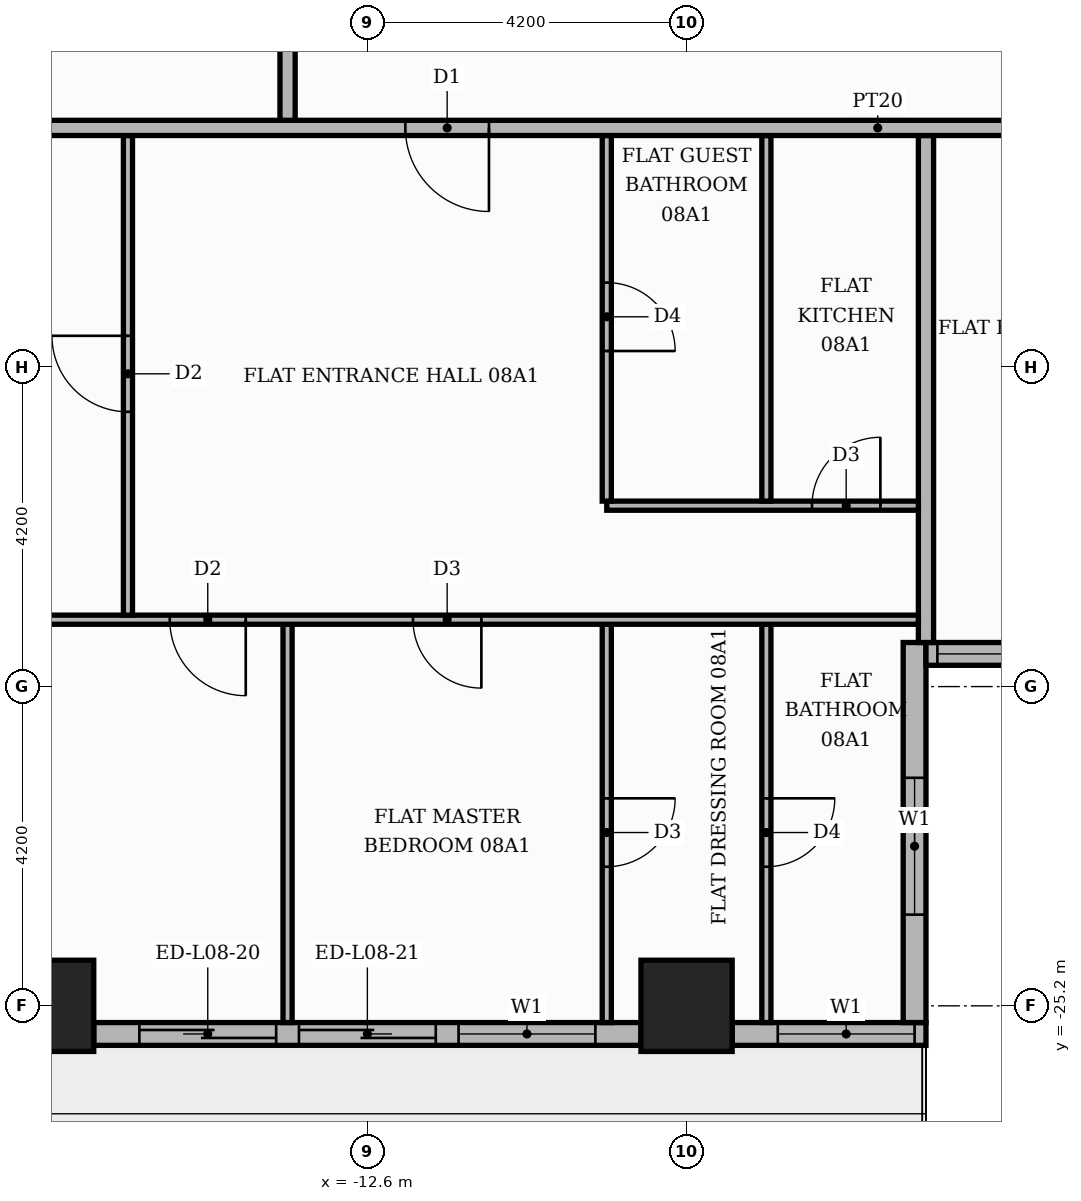
"""IFC4 building model, lengths in metres.
Left out: names, types, materials, properties, quantities, classifications, styles, units other than length and angle.
Written with IfcOpenShell. Run it as: python <this file> out.ifc"""

import sys

from ifc_helpers import new_model, si_unit, direction, frame, frame_2d, origin, origin_2d, place, context, subcontext, project, spatial, rectangle, extrude, element, fill, save


model = new_model("IFC4")
c1 = context("Model", 3, precision=1e-05, world=origin(), true_north=direction((0.0, 1.0)))
c2 = subcontext(c1, "Body", "Model", "MODEL_VIEW")
j1 = project(units=[si_unit("LENGTHUNIT", "METRE"), si_unit("PLANEANGLEUNIT", "RADIAN")], contexts=[c1])
p1 = place(None, origin())
s1 = spatial("IfcSite", under=j1, at=p1, CompositionType="ELEMENT")
p2 = place(p1, origin())
s2 = spatial("IfcBuilding", under=s1, at=p2, CompositionType="ELEMENT")
p3 = place(p2, frame((0.0, 0.0, 38.7)))
s3 = spatial("IfcBuildingStorey", under=s2, at=p3, CompositionType="ELEMENT", Elevation=38.7)
for number, where, z_axis, x_axis in (
    (1, (-8.4, -25.2, 0.0), (0.0, 0.0, 1.0), (1.0, 0.0, 0.0)),
    (2, (-16.8, -25.2, 0.0), (0.0, 0.0, 1.0), (1.0, 0.0, 0.0)),
):
    element("IfcColumn", number, at=place(p3, frame(where, z_axis=z_axis, x_axis=x_axis)), inside=s3, PredefinedType="COLUMN", context=c2, shape_type="SweptSolid", body=[
        extrude(rectangle(XDim=1.2, YDim=1.2, at=origin_2d()), origin(), (0.0, 0.0, 1.0), 3.9),
    ])
p4 = place(p3, frame((-16.2, -25.57, 0.0), z_axis=(0.0, 0.0, 1.0), x_axis=(1.0, 0.0, 0.0)))
e3 = element("IfcWall", 3, at=p4, inside=s3, PredefinedType="STANDARD", context=c2, shape_type="SweptSolid", body=[
    extrude(rectangle(XDim=7.2, YDim=0.3, at=frame_2d((3.6, 0.0))), origin(), (0.0, 0.0, 1.0), 3.48),
])
p5 = place(p4, frame((0.6, 0.0, 0.0)))
e4 = element("IfcOpeningElement", 4, at=p5, cuts=e3, PredefinedType="OPENING", context=c2, shape_type="SweptSolid", body=[
    extrude(rectangle(XDim=1.8, YDim=2.4, at=frame_2d((0.9, 1.2))), frame((0.0, 0.16, 0.0), z_axis=(0.0, -1.0, 0.0), x_axis=(1.0, 0.0, 0.0)), (0.0, 0.0, 1.0), 0.32),
])
p6 = place(p4, frame((2.7, 0.0, 0.0)))
e5 = element("IfcOpeningElement", 5, at=p6, cuts=e3, PredefinedType="OPENING", context=c2, shape_type="SweptSolid", body=[
    extrude(rectangle(XDim=1.8, YDim=2.4, at=frame_2d((0.9, 1.2))), frame((0.0, 0.16, 0.0), z_axis=(0.0, -1.0, 0.0), x_axis=(1.0, 0.0, 0.0)), (0.0, 0.0, 1.0), 0.32),
])
p7 = place(p4, frame((4.8, 0.0, 0.9)))
e6 = element("IfcOpeningElement", 6, at=p7, cuts=e3, PredefinedType="OPENING", context=c2, shape_type="SweptSolid", body=[
    extrude(rectangle(XDim=1.8, YDim=2.1, at=frame_2d((0.9, 1.05))), frame((0.0, 0.16, 0.0), z_axis=(0.0, -1.0, 0.0), x_axis=(1.0, 0.0, 0.0)), (0.0, 0.0, 1.0), 0.32),
])
p8 = place(p3, frame((-7.8, -25.57, 0.0), z_axis=(0.0, 0.0, 1.0), x_axis=(1.0, 0.0, 0.0)))
e7 = element("IfcWall", 7, at=p8, inside=s3, PredefinedType="STANDARD", context=c2, shape_type="SweptSolid", body=[
    extrude(rectangle(XDim=2.55, YDim=0.3, at=frame_2d((1.275, 0.0))), origin(), (0.0, 0.0, 1.0), 3.48),
])
p9 = place(p8, frame((0.6, 0.0, 0.9)))
e8 = element("IfcOpeningElement", 8, at=p9, cuts=e7, PredefinedType="OPENING", context=c2, shape_type="SweptSolid", body=[
    extrude(rectangle(XDim=1.8, YDim=2.1, at=frame_2d((0.9, 1.05))), frame((0.0, 0.16, 0.0), z_axis=(0.0, -1.0, 0.0), x_axis=(1.0, 0.0, 0.0)), (0.0, 0.0, 1.0), 0.32),
])
p10 = place(p3, frame((-5.4, -25.42, 0.0), z_axis=(0.0, 0.0, 1.0), x_axis=(0.0, 1.0, 0.0)))
e9 = element("IfcWall", 9, at=p10, inside=s3, PredefinedType="STANDARD", context=c2, shape_type="SweptSolid", body=[
    extrude(rectangle(XDim=5.0, YDim=0.3, at=frame_2d((2.5, 0.0))), origin(), (0.0, 0.0, 1.0), 3.48),
])
p11 = place(p10, frame((1.42, 0.0, 0.9)))
e10 = element("IfcOpeningElement", 10, at=p11, cuts=e9, PredefinedType="OPENING", context=c2, shape_type="SweptSolid", body=[
    extrude(rectangle(XDim=1.8, YDim=2.1, at=frame_2d((0.9, 1.05))), frame((0.0, 0.16, 0.0), z_axis=(0.0, -1.0, 0.0), x_axis=(1.0, 0.0, 0.0)), (0.0, 0.0, 1.0), 0.32),
])
p12 = place(p3, frame((-5.25, -20.57, 0.0), z_axis=(0.0, 0.0, 1.0), x_axis=(1.0, 0.0, 0.0)))
e11 = element("IfcWall", 11, at=p12, inside=s3, PredefinedType="STANDARD", context=c2, shape_type="SweptSolid", body=[
    extrude(rectangle(XDim=10.8, YDim=0.3, at=frame_2d((5.4, 0.0))), origin(), (0.0, 0.0, 1.0), 3.48),
])
p13 = place(p12, frame((0.15, 0.0, 0.9)))
e12 = element("IfcOpeningElement", 12, at=p13, cuts=e11, PredefinedType="OPENING", context=c2, shape_type="SweptSolid", body=[
    extrude(rectangle(XDim=6.0, YDim=2.1, at=frame_2d((3.0, 1.05))), frame((0.0, 0.16, 0.0), z_axis=(0.0, -1.0, 0.0), x_axis=(1.0, 0.0, 0.0)), (0.0, 0.0, 1.0), 0.32),
])
p14 = place(p12, frame((6.45, 0.0, 0.9)))
e13 = element("IfcOpeningElement", 13, at=p14, cuts=e11, PredefinedType="OPENING", context=c2, shape_type="SweptSolid", body=[
    extrude(rectangle(XDim=3.9, YDim=2.1, at=frame_2d((1.95, 1.05))), frame((0.0, 0.16, 0.0), z_axis=(0.0, -1.0, 0.0), x_axis=(1.0, 0.0, 0.0)), (0.0, 0.0, 1.0), 0.32),
])
p15 = place(p3, frame((-13.65, -25.42, 0.0), z_axis=(0.0, 0.0, 1.0), x_axis=(0.0, 1.0, 0.0)))
e14 = element("IfcWall", 14, at=p15, inside=s3, PredefinedType="PARTITIONING", context=c2, shape_type="SweptSolid", body=[
    extrude(rectangle(XDim=5.24, YDim=0.12, at=frame_2d((2.62, 0.0))), origin(), (0.0, 0.0, 1.0), 3.48),
])
p16 = place(p3, frame((-9.45, -25.42, 0.0), z_axis=(0.0, 0.0, 1.0), x_axis=(0.0, 1.0, 0.0)))
e15 = element("IfcWall", 15, at=p16, inside=s3, PredefinedType="PARTITIONING", context=c2, shape_type="SweptSolid", body=[
    extrude(rectangle(XDim=5.24, YDim=0.12, at=frame_2d((2.62, 0.0))), origin(), (0.0, 0.0, 1.0), 3.48),
])
p17 = place(p16, frame((2.05, 0.0, 0.0)))
e16 = element("IfcOpeningElement", 16, at=p17, cuts=e15, PredefinedType="OPENING", context=c2, shape_type="SweptSolid", body=[
    extrude(rectangle(XDim=0.9, YDim=2.1, at=frame_2d((0.45, 1.05))), frame((0.0, 0.07, 0.0), z_axis=(0.0, -1.0, 0.0), x_axis=(1.0, 0.0, 0.0)), (0.0, 0.0, 1.0), 0.14),
])
p18 = place(p3, frame((-7.35, -25.42, 0.0), z_axis=(0.0, 0.0, 1.0), x_axis=(0.0, 1.0, 0.0)))
e17 = element("IfcWall", 17, at=p18, inside=s3, PredefinedType="PARTITIONING", context=c2, shape_type="SweptSolid", body=[
    extrude(rectangle(XDim=5.24, YDim=0.12, at=frame_2d((2.62, 0.0))), origin(), (0.0, 0.0, 1.0), 3.48),
])
p19 = place(p18, frame((2.05, 0.0, 0.0)))
e18 = element("IfcOpeningElement", 18, at=p19, cuts=e17, PredefinedType="OPENING", context=c2, shape_type="SweptSolid", body=[
    extrude(rectangle(XDim=0.9, YDim=2.1, at=frame_2d((0.45, 1.05))), frame((0.0, 0.07, 0.0), z_axis=(0.0, -1.0, 0.0), x_axis=(1.0, 0.0, 0.0)), (0.0, 0.0, 1.0), 0.14),
])
p20 = place(p3, frame((-5.25, -20.42, 0.0), z_axis=(0.0, 0.0, 1.0), x_axis=(0.0, 1.0, 0.0)))
e19 = element("IfcWall", 19, at=p20, inside=s3, PredefinedType="PARTITIONING", context=c2, shape_type="SweptSolid", body=[
    extrude(rectangle(XDim=6.67, YDim=0.2, at=frame_2d((3.335, 0.0))), origin(), (0.0, 0.0, 1.0), 3.48),
])
p21 = place(p3, frame((-17.3, -20.12, 0.0), z_axis=(0.0, 0.0, 1.0), x_axis=(1.0, 0.0, 0.0)))
e20 = element("IfcWall", 20, at=p21, inside=s3, PredefinedType="PARTITIONING", context=c2, shape_type="SweptSolid", body=[
    extrude(rectangle(XDim=11.95, YDim=0.12, at=frame_2d((5.975, 0.0))), origin(), (0.0, 0.0, 1.0), 3.48),
])
p22 = place(p21, frame((2.1, 0.0, 0.0)))
e21 = element("IfcOpeningElement", 21, at=p22, cuts=e20, PredefinedType="OPENING", context=c2, shape_type="SweptSolid", body=[
    extrude(rectangle(XDim=1.0, YDim=2.1, at=frame_2d((0.5, 1.05))), frame((0.0, 0.07, 0.0), z_axis=(0.0, -1.0, 0.0), x_axis=(1.0, 0.0, 0.0)), (0.0, 0.0, 1.0), 0.14),
])
p23 = place(p21, frame((5.3, 0.0, 0.0)))
e22 = element("IfcOpeningElement", 22, at=p23, cuts=e20, PredefinedType="OPENING", context=c2, shape_type="SweptSolid", body=[
    extrude(rectangle(XDim=0.9, YDim=2.1, at=frame_2d((0.45, 1.05))), frame((0.0, 0.07, 0.0), z_axis=(0.0, -1.0, 0.0), x_axis=(1.0, 0.0, 0.0)), (0.0, 0.0, 1.0), 0.14),
])
p24 = place(p3, frame((-15.75, -20.06, 0.0), z_axis=(0.0, 0.0, 1.0), x_axis=(0.0, 1.0, 0.0)))
e23 = element("IfcWall", 23, at=p24, inside=s3, PredefinedType="PARTITIONING", context=c2, shape_type="SweptSolid", body=[
    extrude(rectangle(XDim=6.31, YDim=0.12, at=frame_2d((3.155, 0.0))), origin(), (0.0, 0.0, 1.0), 3.48),
])
p25 = place(p24, frame((2.675, 0.0, 0.0)))
e24 = element("IfcOpeningElement", 24, at=p25, cuts=e23, PredefinedType="OPENING", context=c2, shape_type="SweptSolid", body=[
    extrude(rectangle(XDim=1.0, YDim=2.1, at=frame_2d((0.5, 1.05))), frame((0.0, 0.07, 0.0), z_axis=(0.0, -1.0, 0.0), x_axis=(1.0, 0.0, 0.0)), (0.0, 0.0, 1.0), 0.14),
])
p26 = place(p3, frame((-9.45, -18.62, 0.0), z_axis=(0.0, 0.0, 1.0), x_axis=(1.0, 0.0, 0.0)))
e25 = element("IfcWall", 25, at=p26, inside=s3, PredefinedType="PARTITIONING", context=c2, shape_type="SweptSolid", body=[
    extrude(rectangle(XDim=4.1, YDim=0.12, at=frame_2d((2.05, 0.0))), origin(), (0.0, 0.0, 1.0), 3.48),
])
p27 = place(p26, frame((2.7, 0.0, 0.0)))
e26 = element("IfcOpeningElement", 26, at=p27, cuts=e25, PredefinedType="OPENING", context=c2, shape_type="SweptSolid", body=[
    extrude(rectangle(XDim=0.9, YDim=2.1, at=frame_2d((0.45, 1.05))), frame((0.0, 0.07, 0.0), z_axis=(0.0, -1.0, 0.0), x_axis=(1.0, 0.0, 0.0)), (0.0, 0.0, 1.0), 0.14),
])
p28 = place(p3, frame((-9.45, -18.56, 0.0), z_axis=(0.0, 0.0, 1.0), x_axis=(0.0, 1.0, 0.0)))
e27 = element("IfcWall", 27, at=p28, inside=s3, PredefinedType="PARTITIONING", context=c2, shape_type="SweptSolid", body=[
    extrude(rectangle(XDim=4.81, YDim=0.12, at=frame_2d((2.405, 0.0))), origin(), (0.0, 0.0, 1.0), 3.48),
])
p29 = place(p28, frame((1.975, 0.0, 0.0)))
e28 = element("IfcOpeningElement", 28, at=p29, cuts=e27, PredefinedType="OPENING", context=c2, shape_type="SweptSolid", body=[
    extrude(rectangle(XDim=0.9, YDim=2.1, at=frame_2d((0.45, 1.05))), frame((0.0, 0.07, 0.0), z_axis=(0.0, -1.0, 0.0), x_axis=(1.0, 0.0, 0.0)), (0.0, 0.0, 1.0), 0.14),
])
p30 = place(p3, frame((-7.35, -18.56, 0.0), z_axis=(0.0, 0.0, 1.0), x_axis=(0.0, 1.0, 0.0)))
e29 = element("IfcWall", 29, at=p30, inside=s3, PredefinedType="PARTITIONING", context=c2, shape_type="SweptSolid", body=[
    extrude(rectangle(XDim=4.81, YDim=0.12, at=frame_2d((2.405, 0.0))), origin(), (0.0, 0.0, 1.0), 3.48),
])
p31 = place(p3, frame((-25.42, -13.65, 0.0), z_axis=(0.0, 0.0, 1.0), x_axis=(1.0, 0.0, 0.0)))
e30 = element("IfcWall", 30, at=p31, inside=s3, PredefinedType="PARTITIONING", context=c2, shape_type="SweptSolid", body=[
    extrude(rectangle(XDim=39.07, YDim=0.2, at=frame_2d((19.535, 0.0))), origin(), (0.0, 0.0, 1.0), 3.48),
])
p32 = place(p31, frame((13.32, 0.0, 0.0)))
e31 = element("IfcOpeningElement", 31, at=p32, cuts=e30, PredefinedType="OPENING", context=c2, shape_type="SweptSolid", body=[
    extrude(rectangle(XDim=1.1, YDim=2.4, at=frame_2d((0.55, 1.2))), frame((0.0, 0.11, 0.0), z_axis=(0.0, -1.0, 0.0), x_axis=(1.0, 0.0, 0.0)), (0.0, 0.0, 1.0), 0.22),
])
p33 = place(p31, frame((21.72, 0.0, 0.0)))
e32 = element("IfcOpeningElement", 32, at=p33, cuts=e30, PredefinedType="OPENING", context=c2, shape_type="SweptSolid", body=[
    extrude(rectangle(XDim=1.1, YDim=2.4, at=frame_2d((0.55, 1.2))), frame((0.0, 0.11, 0.0), z_axis=(0.0, -1.0, 0.0), x_axis=(1.0, 0.0, 0.0)), (0.0, 0.0, 1.0), 0.22),
])
p34 = place(p3, frame((-13.65, -13.55, 0.0), z_axis=(0.0, 0.0, 1.0), x_axis=(0.0, 1.0, 0.0)))
e33 = element("IfcWall", 33, at=p34, inside=s3, PredefinedType="PARTITIONING", context=c2, shape_type="SweptSolid", body=[
    extrude(rectangle(XDim=27.1, YDim=0.2, at=frame_2d((13.55, 0.0))), origin(), (0.0, 0.0, 1.0), 3.48),
])
p35 = place(p34, frame((24.55, 0.0, 0.0)))
e34 = element("IfcOpeningElement", 34, at=p35, cuts=e33, PredefinedType="OPENING", context=c2, shape_type="SweptSolid", body=[
    extrude(rectangle(XDim=1.1, YDim=2.4, at=frame_2d((0.55, 1.2))), frame((0.0, 0.11, 0.0), z_axis=(0.0, -1.0, 0.0), x_axis=(1.0, 0.0, 0.0)), (0.0, 0.0, 1.0), 0.22),
])
p36 = place(p5, origin())
e35 = element("IfcDoor", 35, at=p36, inside=s3, OperationType="SLIDING_TO_LEFT", PredefinedType="DOOR", context=c2, shape_type="SweptSolid", body=[
    extrude(rectangle(XDim=1.8, YDim=2.4, at=frame_2d((0.9, 1.2))), frame((0.0, 0.025, 0.0), z_axis=(0.0, -1.0, 0.0), x_axis=(1.0, 0.0, 0.0)), (0.0, 0.0, 1.0), 0.05),
])
fill(e4, e35)
p37 = place(p6, origin())
e36 = element("IfcDoor", 36, at=p37, inside=s3, OperationType="SLIDING_TO_RIGHT", PredefinedType="DOOR", context=c2, shape_type="SweptSolid", body=[
    extrude(rectangle(XDim=1.8, YDim=2.4, at=frame_2d((0.9, 1.2))), frame((0.0, 0.025, 0.0), z_axis=(0.0, -1.0, 0.0), x_axis=(1.0, 0.0, 0.0)), (0.0, 0.0, 1.0), 0.05),
])
fill(e5, e36)
p38 = place(p7, origin())
e37 = element("IfcWindow", 37, at=p38, inside=s3, PartitioningType="SINGLE_PANEL", PredefinedType="WINDOW", context=c2, shape_type="SweptSolid", body=[
    extrude(rectangle(XDim=1.8, YDim=2.1, at=frame_2d((0.9, 1.05))), frame((0.0, 0.03, 0.0), z_axis=(0.0, -1.0, 0.0), x_axis=(1.0, 0.0, 0.0)), (0.0, 0.0, 1.0), 0.06),
])
fill(e6, e37)
p39 = place(p9, origin())
e38 = element("IfcWindow", 38, at=p39, inside=s3, PartitioningType="SINGLE_PANEL", PredefinedType="WINDOW", context=c2, shape_type="SweptSolid", body=[
    extrude(rectangle(XDim=1.8, YDim=2.1, at=frame_2d((0.9, 1.05))), frame((0.0, 0.03, 0.0), z_axis=(0.0, -1.0, 0.0), x_axis=(1.0, 0.0, 0.0)), (0.0, 0.0, 1.0), 0.06),
])
fill(e8, e38)
p40 = place(p11, origin())
e39 = element("IfcWindow", 39, at=p40, inside=s3, PartitioningType="SINGLE_PANEL", PredefinedType="WINDOW", context=c2, shape_type="SweptSolid", body=[
    extrude(rectangle(XDim=1.8, YDim=2.1, at=frame_2d((0.9, 1.05))), frame((0.0, 0.03, 0.0), z_axis=(0.0, -1.0, 0.0), x_axis=(1.0, 0.0, 0.0)), (0.0, 0.0, 1.0), 0.06),
])
fill(e10, e39)
p41 = place(p13, origin())
e40 = element("IfcWindow", 40, at=p41, inside=s3, PartitioningType="SINGLE_PANEL", PredefinedType="WINDOW", context=c2, shape_type="SweptSolid", body=[
    extrude(rectangle(XDim=6.0, YDim=2.1, at=frame_2d((3.0, 1.05))), frame((0.0, 0.03, 0.0), z_axis=(0.0, -1.0, 0.0), x_axis=(1.0, 0.0, 0.0)), (0.0, 0.0, 1.0), 0.06),
])
fill(e12, e40)
p42 = place(p32, frame((1.1, 0.0, 0.0), z_axis=(0.0, 0.0, 1.0), x_axis=(-1.0, 0.0, 0.0)))
e41 = element("IfcDoor", 41, at=p42, inside=s3, OperationType="SINGLE_SWING_RIGHT", PredefinedType="DOOR", context=c2, shape_type="SweptSolid", body=[
    extrude(rectangle(XDim=1.1, YDim=2.4, at=frame_2d((0.55, 1.2))), frame((0.0, 0.025, 0.0), z_axis=(0.0, -1.0, 0.0), x_axis=(1.0, 0.0, 0.0)), (0.0, 0.0, 1.0), 0.05),
])
fill(e31, e41)
p43 = place(p25, origin())
e42 = element("IfcDoor", 42, at=p43, inside=s3, OperationType="SINGLE_SWING_RIGHT", PredefinedType="DOOR", context=c2, shape_type="SweptSolid", body=[
    extrude(rectangle(XDim=1.0, YDim=2.1, at=frame_2d((0.5, 1.05))), frame((0.0, 0.025, 0.0), z_axis=(0.0, -1.0, 0.0), x_axis=(1.0, 0.0, 0.0)), (0.0, 0.0, 1.0), 0.05),
])
fill(e24, e42)
p44 = place(p29, frame((0.9, 0.0, 0.0), z_axis=(0.0, 0.0, 1.0), x_axis=(-1.0, 0.0, 0.0)))
e43 = element("IfcDoor", 43, at=p44, inside=s3, OperationType="SINGLE_SWING_LEFT", PredefinedType="DOOR", context=c2, shape_type="SweptSolid", body=[
    extrude(rectangle(XDim=0.9, YDim=2.1, at=frame_2d((0.45, 1.05))), frame((0.0, 0.025, 0.0), z_axis=(0.0, -1.0, 0.0), x_axis=(1.0, 0.0, 0.0)), (0.0, 0.0, 1.0), 0.05),
])
fill(e28, e43)
p45 = place(p27, origin())
e44 = element("IfcDoor", 44, at=p45, inside=s3, OperationType="SINGLE_SWING_RIGHT", PredefinedType="DOOR", context=c2, shape_type="SweptSolid", body=[
    extrude(rectangle(XDim=0.9, YDim=2.1, at=frame_2d((0.45, 1.05))), frame((0.0, 0.025, 0.0), z_axis=(0.0, -1.0, 0.0), x_axis=(1.0, 0.0, 0.0)), (0.0, 0.0, 1.0), 0.05),
])
fill(e26, e44)
p46 = place(p22, frame((1.0, 0.0, 0.0), z_axis=(0.0, 0.0, 1.0), x_axis=(-1.0, 0.0, 0.0)))
e45 = element("IfcDoor", 45, at=p46, inside=s3, OperationType="SINGLE_SWING_RIGHT", PredefinedType="DOOR", context=c2, shape_type="SweptSolid", body=[
    extrude(rectangle(XDim=1.0, YDim=2.1, at=frame_2d((0.5, 1.05))), frame((0.0, 0.025, 0.0), z_axis=(0.0, -1.0, 0.0), x_axis=(1.0, 0.0, 0.0)), (0.0, 0.0, 1.0), 0.05),
])
fill(e21, e45)
p47 = place(p23, frame((0.9, 0.0, 0.0), z_axis=(0.0, 0.0, 1.0), x_axis=(-1.0, 0.0, 0.0)))
e46 = element("IfcDoor", 46, at=p47, inside=s3, OperationType="SINGLE_SWING_RIGHT", PredefinedType="DOOR", context=c2, shape_type="SweptSolid", body=[
    extrude(rectangle(XDim=0.9, YDim=2.1, at=frame_2d((0.45, 1.05))), frame((0.0, 0.025, 0.0), z_axis=(0.0, -1.0, 0.0), x_axis=(1.0, 0.0, 0.0)), (0.0, 0.0, 1.0), 0.05),
])
fill(e22, e46)
p48 = place(p17, frame((0.9, 0.0, 0.0), z_axis=(0.0, 0.0, 1.0), x_axis=(-1.0, 0.0, 0.0)))
e47 = element("IfcDoor", 47, at=p48, inside=s3, OperationType="SINGLE_SWING_RIGHT", PredefinedType="DOOR", context=c2, shape_type="SweptSolid", body=[
    extrude(rectangle(XDim=0.9, YDim=2.1, at=frame_2d((0.45, 1.05))), frame((0.0, 0.025, 0.0), z_axis=(0.0, -1.0, 0.0), x_axis=(1.0, 0.0, 0.0)), (0.0, 0.0, 1.0), 0.05),
])
fill(e16, e47)
p49 = place(p19, frame((0.9, 0.0, 0.0), z_axis=(0.0, 0.0, 1.0), x_axis=(-1.0, 0.0, 0.0)))
e48 = element("IfcDoor", 48, at=p49, inside=s3, OperationType="SINGLE_SWING_RIGHT", PredefinedType="DOOR", context=c2, shape_type="SweptSolid", body=[
    extrude(rectangle(XDim=0.9, YDim=2.1, at=frame_2d((0.45, 1.05))), frame((0.0, 0.025, 0.0), z_axis=(0.0, -1.0, 0.0), x_axis=(1.0, 0.0, 0.0)), (0.0, 0.0, 1.0), 0.05),
])
fill(e18, e48)
save(model, sys.argv[1])
